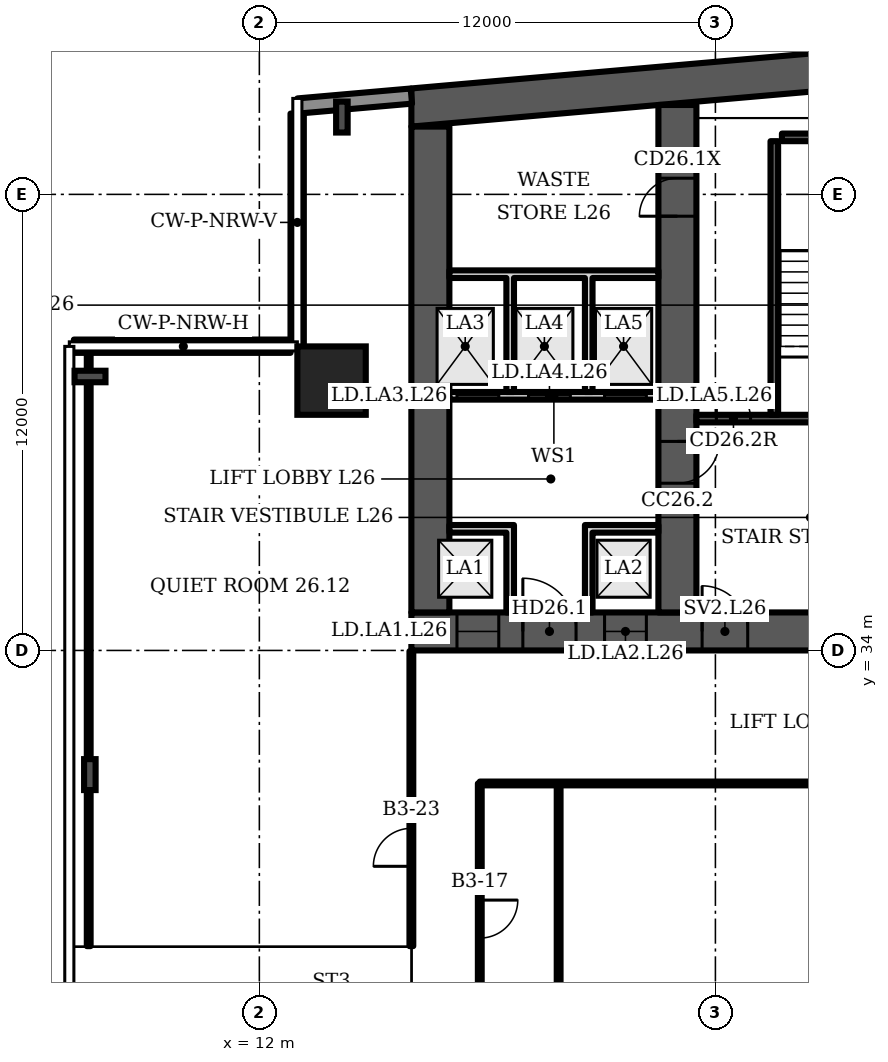
"""IFC4 building model, lengths in metres.
Left out: names, types, materials, properties, quantities, classifications, styles, units other than length and angle.
Written with IfcOpenShell. Run it as: python <this file> out.ifc"""

import sys

from ifc_helpers import new_model, si_unit, direction, frame, frame_2d, origin, origin_2d, place, context, subcontext, project, spatial, polyline, rectangle, i_section, outline, extrude, element, fill, save


model = new_model("IFC4")
c1 = context("Model", 3, precision=1e-05, world=origin(), true_north=direction((0.0, 1.0)))
c2 = subcontext(c1, "Body", "Model", "MODEL_VIEW")
j1 = project(units=[si_unit("LENGTHUNIT", "METRE"), si_unit("PLANEANGLEUNIT", "RADIAN")], contexts=[c1])
p1 = place(None, origin())
s1 = spatial("IfcSite", under=j1, at=p1, CompositionType="ELEMENT")
p2 = place(p1, origin())
s2 = spatial("IfcBuilding", under=s1, at=p2, CompositionType="ELEMENT")
p3 = place(p2, frame((0.0, 0.0, 114.7)))
s3 = spatial("IfcBuildingStorey", under=s2, at=p3, CompositionType="ELEMENT", Elevation=114.7)
p4 = place(p3, origin())
e1 = element("IfcWall", 1, at=p4, inside=s3, PredefinedType="SHEAR", context=c2, shape_type="SweptSolid", body=[
    extrude(outline(polyline([(16.0, 47.784), (40.5, 49.927), (65.0, 47.784), (65.0, 48.787), (40.5, 50.931), (16.0, 48.787), (16.0, 47.784)])), origin(), (0.0, 0.0, 1.0), 3.6),
])
p5 = place(p3, frame((16.0, 34.5, 0.0), z_axis=(0.0, 0.0, 1.0), x_axis=(1.0, 0.0, 0.0)))
e2 = element("IfcWall", 2, at=p5, inside=s3, PredefinedType="SHEAR", context=c2, shape_type="SweptSolid", body=[
    extrude(rectangle(XDim=49.0, YDim=1.0, at=frame_2d((24.5, 0.0))), origin(), (0.0, 0.0, 1.0), 3.6),
])
p6 = place(p5, frame((1.2, 0.0, 0.0)))
e3 = element("IfcOpeningElement", 3, at=p6, cuts=e2, PredefinedType="OPENING", context=c2, shape_type="SweptSolid", body=[
    extrude(rectangle(XDim=1.1, YDim=2.1, at=frame_2d((0.55, 1.05))), frame((0.0, 0.51, 0.0), z_axis=(0.0, -1.0, 0.0), x_axis=(1.0, 0.0, 0.0)), (0.0, 0.0, 1.0), 1.02),
])
p7 = place(p5, frame((5.083, 0.0, 0.0)))
e4 = element("IfcOpeningElement", 4, at=p7, cuts=e2, PredefinedType="OPENING", context=c2, shape_type="SweptSolid", body=[
    extrude(rectangle(XDim=1.1, YDim=2.1, at=frame_2d((0.55, 1.05))), frame((0.0, 0.51, 0.0), z_axis=(0.0, -1.0, 0.0), x_axis=(1.0, 0.0, 0.0)), (0.0, 0.0, 1.0), 1.02),
])
p8 = place(p5, frame((2.933, 0.0, 0.0)))
e5 = element("IfcOpeningElement", 5, at=p8, cuts=e2, PredefinedType="OPENING", context=c2, shape_type="SweptSolid", body=[
    extrude(rectangle(XDim=1.4, YDim=2.1, at=frame_2d((0.7, 1.05))), frame((0.0, 0.51, 0.0), z_axis=(0.0, -1.0, 0.0), x_axis=(1.0, 0.0, 0.0)), (0.0, 0.0, 1.0), 1.02),
])
p9 = place(p5, frame((7.65, 0.0, 0.0)))
e6 = element("IfcOpeningElement", 6, at=p9, cuts=e2, PredefinedType="OPENING", context=c2, shape_type="SweptSolid", body=[
    extrude(rectangle(XDim=1.2, YDim=2.1, at=frame_2d((0.6, 1.05))), frame((0.0, 0.51, 0.0), z_axis=(0.0, -1.0, 0.0), x_axis=(1.0, 0.0, 0.0)), (0.0, 0.0, 1.0), 1.02),
])
p10 = place(p5, frame((14.817, 0.0, 0.0)))
e7 = element("IfcOpeningElement", 7, at=p10, cuts=e2, PredefinedType="OPENING", context=c2, shape_type="SweptSolid", body=[
    extrude(rectangle(XDim=1.1, YDim=2.1, at=frame_2d((0.55, 1.05))), frame((0.0, 0.51, 0.0), z_axis=(0.0, -1.0, 0.0), x_axis=(1.0, 0.0, 0.0)), (0.0, 0.0, 1.0), 1.02),
])
p11 = place(p5, frame((19.083, 0.0, 0.0)))
e8 = element("IfcOpeningElement", 8, at=p11, cuts=e2, PredefinedType="OPENING", context=c2, shape_type="SweptSolid", body=[
    extrude(rectangle(XDim=1.1, YDim=2.1, at=frame_2d((0.55, 1.05))), frame((0.0, 0.51, 0.0), z_axis=(0.0, -1.0, 0.0), x_axis=(1.0, 0.0, 0.0)), (0.0, 0.0, 1.0), 1.02),
])
p12 = place(p5, frame((16.8, 0.0, 0.0)))
e9 = element("IfcOpeningElement", 9, at=p12, cuts=e2, PredefinedType="OPENING", context=c2, shape_type="SweptSolid", body=[
    extrude(rectangle(XDim=1.4, YDim=2.1, at=frame_2d((0.7, 1.05))), frame((0.0, 0.51, 0.0), z_axis=(0.0, -1.0, 0.0), x_axis=(1.0, 0.0, 0.0)), (0.0, 0.0, 1.0), 1.02),
])
p13 = place(p5, frame((21.817, 0.0, 0.0)))
e10 = element("IfcOpeningElement", 10, at=p13, cuts=e2, PredefinedType="OPENING", context=c2, shape_type="SweptSolid", body=[
    extrude(rectangle(XDim=1.1, YDim=2.1, at=frame_2d((0.55, 1.05))), frame((0.0, 0.51, 0.0), z_axis=(0.0, -1.0, 0.0), x_axis=(1.0, 0.0, 0.0)), (0.0, 0.0, 1.0), 1.02),
])
p14 = place(p5, frame((26.083, 0.0, 0.0)))
e11 = element("IfcOpeningElement", 11, at=p14, cuts=e2, PredefinedType="OPENING", context=c2, shape_type="SweptSolid", body=[
    extrude(rectangle(XDim=1.1, YDim=2.1, at=frame_2d((0.55, 1.05))), frame((0.0, 0.51, 0.0), z_axis=(0.0, -1.0, 0.0), x_axis=(1.0, 0.0, 0.0)), (0.0, 0.0, 1.0), 1.02),
])
p15 = place(p5, frame((33.15, 0.0, 0.0)))
e12 = element("IfcOpeningElement", 12, at=p15, cuts=e2, PredefinedType="OPENING", context=c2, shape_type="SweptSolid", body=[
    extrude(rectangle(XDim=1.2, YDim=2.1, at=frame_2d((0.6, 1.05))), frame((0.0, 0.51, 0.0), z_axis=(0.0, -1.0, 0.0), x_axis=(1.0, 0.0, 0.0)), (0.0, 0.0, 1.0), 1.02),
])
p16 = place(p5, frame((37.8, 0.0, 0.0)))
e13 = element("IfcOpeningElement", 13, at=p16, cuts=e2, PredefinedType="OPENING", context=c2, shape_type="SweptSolid", body=[
    extrude(rectangle(XDim=1.4, YDim=2.1, at=frame_2d((0.7, 1.05))), frame((0.0, 0.51, 0.0), z_axis=(0.0, -1.0, 0.0), x_axis=(1.0, 0.0, 0.0)), (0.0, 0.0, 1.0), 1.02),
])
p17 = place(p5, frame((42.817, 0.0, 0.0)))
e14 = element("IfcOpeningElement", 14, at=p17, cuts=e2, PredefinedType="OPENING", context=c2, shape_type="SweptSolid", body=[
    extrude(rectangle(XDim=1.1, YDim=2.1, at=frame_2d((0.55, 1.05))), frame((0.0, 0.51, 0.0), z_axis=(0.0, -1.0, 0.0), x_axis=(1.0, 0.0, 0.0)), (0.0, 0.0, 1.0), 1.02),
])
p18 = place(p5, frame((46.7, 0.0, 0.0)))
e15 = element("IfcOpeningElement", 15, at=p18, cuts=e2, PredefinedType="OPENING", context=c2, shape_type="SweptSolid", body=[
    extrude(rectangle(XDim=1.1, YDim=2.1, at=frame_2d((0.55, 1.05))), frame((0.0, 0.51, 0.0), z_axis=(0.0, -1.0, 0.0), x_axis=(1.0, 0.0, 0.0)), (0.0, 0.0, 1.0), 1.02),
])
p19 = place(p5, frame((44.667, 0.0, 0.0)))
e16 = element("IfcOpeningElement", 16, at=p19, cuts=e2, PredefinedType="OPENING", context=c2, shape_type="SweptSolid", body=[
    extrude(rectangle(XDim=1.4, YDim=2.1, at=frame_2d((0.7, 1.05))), frame((0.0, 0.51, 0.0), z_axis=(0.0, -1.0, 0.0), x_axis=(1.0, 0.0, 0.0)), (0.0, 0.0, 1.0), 1.02),
])
p20 = place(p3, frame((16.5, 35.0, 0.0), z_axis=(0.0, 0.0, 1.0), x_axis=(0.0, 1.0, 0.0)))
e17 = element("IfcWall", 17, at=p20, inside=s3, PredefinedType="SHEAR", context=c2, shape_type="SweptSolid", body=[
    extrude(rectangle(XDim=12.784, YDim=1.0, at=frame_2d((6.392, 0.0))), origin(), (0.0, 0.0, 1.0), 3.6),
])
p21 = place(p3, frame((23.0, 35.0, 0.0), z_axis=(0.0, 0.0, 1.0), x_axis=(0.0, 1.0, 0.0)))
e18 = element("IfcWall", 18, at=p21, inside=s3, PredefinedType="SHEAR", context=c2, shape_type="SweptSolid", body=[
    extrude(rectangle(XDim=13.352, YDim=1.0, at=frame_2d((6.676, 0.0))), origin(), (0.0, 0.0, 1.0), 3.6),
])
p22 = place(p21, frame((10.426, 0.0, 0.0)))
e19 = element("IfcOpeningElement", 19, at=p22, cuts=e18, PredefinedType="OPENING", context=c2, shape_type="SweptSolid", body=[
    extrude(rectangle(XDim=1.0, YDim=2.1, at=frame_2d((0.5, 1.05))), frame((0.0, 0.51, 0.0), z_axis=(0.0, -1.0, 0.0), x_axis=(1.0, 0.0, 0.0)), (0.0, 0.0, 1.0), 1.02),
])
p23 = place(p21, frame((3.4, 0.0, 0.0)))
e20 = element("IfcOpeningElement", 20, at=p23, cuts=e18, PredefinedType="OPENING", context=c2, shape_type="SweptSolid", body=[
    extrude(rectangle(XDim=1.1, YDim=2.1, at=frame_2d((0.55, 1.05))), frame((0.0, 0.51, 0.0), z_axis=(0.0, -1.0, 0.0), x_axis=(1.0, 0.0, 0.0)), (0.0, 0.0, 1.0), 1.02),
])
p24 = place(p3, frame((13.9, 41.1, 0.0), z_axis=(0.0, 0.0, 1.0), x_axis=(1.0, 0.0, 0.0)))
e21 = element("IfcColumn", 21, at=p24, inside=s3, PredefinedType="COLUMN", context=c2, shape_type="SweptSolid", body=[
    extrude(rectangle(XDim=1.8, YDim=1.8, at=origin_2d()), origin(), (0.0, 0.0, 1.0), 3.6),
])
for number, where, z_axis, x_axis in (
    (22, (14.172, 48.034, 0.0), (0.0, 0.0, 1.0), (-1.0, 0.0, 0.0)),
    (23, (7.544, 41.208, 0.0), (0.0, 0.0, 1.0), (0.0, 1.0, 0.0)),
    (24, (7.54, 30.733, 0.0), (0.0, 0.0, 1.0), (-1.0, 0.0, 0.0)),
):
    element("IfcColumn", number, at=place(p3, frame(where, z_axis=z_axis, x_axis=x_axis)), inside=s3, PredefinedType="COLUMN", context=c2, shape_type="SweptSolid", body=[
        extrude(i_section(OverallWidth=0.303, OverallDepth=0.814, WebThickness=0.021, FlangeThickness=0.04, FilletRadius=0.03, at=origin_2d()), origin(), (0.0, 0.0, 1.0), 3.6),
    ])
p25 = place(p3, frame((16.0, 48.587, 0.0), z_axis=(0.0, 0.0, 1.0), x_axis=(-0.996194, -0.087168, 0.0)))
e25 = element("IfcWall", 25, at=p25, inside=s3, PredefinedType="SOLIDWALL", context=c2, shape_type="SweptSolid", body=[
    extrude(rectangle(XDim=2.994, YDim=0.4, at=frame_2d((1.497, 0.0))), origin(), (0.0, 0.0, 1.0), 3.2),
])
p26 = place(p3, frame((12.995, 48.126, 0.0), z_axis=(0.0, 0.0, 1.0), x_axis=(0.0, -1.0, 0.0)))
e26 = element("IfcWall", 26, at=p26, inside=s3, PredefinedType="SOLIDWALL", context=c2, shape_type="SweptSolid", body=[
    extrude(rectangle(XDim=6.126, YDim=0.35, at=frame_2d((3.063, 0.0))), origin(), (0.0, 0.0, 1.0), 1.0),
])
p27 = place(p3, frame((12.82, 42.005, 0.0), z_axis=(0.0, 0.0, 1.0), x_axis=(-1.0, 0.0, 0.0)))
e27 = element("IfcWall", 27, at=p27, inside=s3, PredefinedType="SOLIDWALL", context=c2, shape_type="SweptSolid", body=[
    extrude(rectangle(XDim=5.7, YDim=0.35, at=frame_2d((2.85, 0.0))), origin(), (0.0, 0.0, 1.0), 1.0),
])
p28 = place(p3, frame((17.0, 40.7, 0.0), z_axis=(0.0, 0.0, 1.0), x_axis=(1.0, 0.0, 0.0)))
e28 = element("IfcWall", 28, at=p28, inside=s3, PredefinedType="PARTITIONING", context=c2, shape_type="SweptSolid", body=[
    extrude(rectangle(XDim=5.5, YDim=0.2, at=frame_2d((2.75, 0.0))), origin(), (0.0, 0.0, 1.0), 3.2),
])
p29 = place(p28, frame((0.2, 0.0, 0.0)))
e29 = element("IfcOpeningElement", 29, at=p29, cuts=e28, PredefinedType="OPENING", context=c2, shape_type="SweptSolid", body=[
    extrude(rectangle(XDim=1.1, YDim=2.1, at=frame_2d((0.55, 1.05))), frame((0.0, 0.11, 0.0), z_axis=(0.0, -1.0, 0.0), x_axis=(1.0, 0.0, 0.0)), (0.0, 0.0, 1.0), 0.22),
])
p30 = place(p28, frame((2.083, 0.0, 0.0)))
e30 = element("IfcOpeningElement", 30, at=p30, cuts=e28, PredefinedType="OPENING", context=c2, shape_type="SweptSolid", body=[
    extrude(rectangle(XDim=1.1, YDim=2.1, at=frame_2d((0.55, 1.05))), frame((0.0, 0.11, 0.0), z_axis=(0.0, -1.0, 0.0), x_axis=(1.0, 0.0, 0.0)), (0.0, 0.0, 1.0), 0.22),
])
p31 = place(p28, frame((4.083, 0.0, 0.0)))
e31 = element("IfcOpeningElement", 31, at=p31, cuts=e28, PredefinedType="OPENING", context=c2, shape_type="SweptSolid", body=[
    extrude(rectangle(XDim=1.1, YDim=2.1, at=frame_2d((0.55, 1.05))), frame((0.0, 0.11, 0.0), z_axis=(0.0, -1.0, 0.0), x_axis=(1.0, 0.0, 0.0)), (0.0, 0.0, 1.0), 0.22),
])
p32 = place(p3, frame((0.0, 0.0, -0.0)))
e32 = element("IfcWall", 32, at=p32, inside=s3, PredefinedType="PARTITIONING", context=c2, shape_type="SweptSolid", body=[
    extrude(outline(polyline([(18.5, 37.1), (17.0, 37.1), (17.0, 37.3), (18.5, 37.3), (18.7, 37.3), (18.7, 35.0), (18.5, 35.0), (18.5, 37.1)])), origin(), (0.0, 0.0, 1.0), 3.2),
])
p33 = place(p3, frame((0.0, 0.0, -0.0)))
e33 = element("IfcWall", 33, at=p33, inside=s3, PredefinedType="PARTITIONING", context=c2, shape_type="SweptSolid", body=[
    extrude(outline(polyline([(20.567, 37.3), (20.767, 37.3), (22.5, 37.3), (22.5, 37.1), (20.767, 37.1), (20.767, 35.0), (20.567, 35.0), (20.567, 37.3)])), origin(), (0.0, 0.0, 1.0), 3.2),
])
p34 = place(p3, frame((0.0, 0.0, -0.0)))
e34 = element("IfcWall", 34, at=p34, inside=s3, PredefinedType="PARTITIONING", context=c2, shape_type="SweptSolid", body=[
    extrude(outline(polyline([(18.7, 40.8), (18.5, 40.8), (18.5, 43.8), (17.0, 43.8), (17.0, 44.0), (22.5, 44.0), (22.5, 43.8), (20.767, 43.8), (20.767, 40.8), (20.567, 40.8), (20.567, 43.8), (18.7, 43.8), (18.7, 40.8)])), origin(), (0.0, 0.0, 1.0), 3.2),
])
p35 = place(p3, frame((23.5, 40.1, 0.0), z_axis=(0.0, 0.0, 1.0), x_axis=(1.0, 0.0, 0.0)))
e35 = element("IfcWall", 35, at=p35, inside=s3, PredefinedType="SHEAR", context=c2, shape_type="SweptSolid", body=[
    extrude(rectangle(XDim=6.0, YDim=0.2, at=frame_2d((3.0, 0.0))), origin(), (0.0, 0.0, 1.0), 3.2),
])
p36 = place(p35, frame((3.425, 0.0, 0.0)))
e36 = element("IfcOpeningElement", 36, at=p36, cuts=e35, PredefinedType="OPENING", context=c2, shape_type="SweptSolid", body=[
    extrude(rectangle(XDim=1.2, YDim=2.1, at=frame_2d((0.6, 1.05))), frame((0.0, 0.11, 0.0), z_axis=(0.0, -1.0, 0.0), x_axis=(1.0, 0.0, 0.0)), (0.0, 0.0, 1.0), 0.22),
])
p37 = place(p35, frame((0.525, 0.0, 0.0)))
e37 = element("IfcOpeningElement", 37, at=p37, cuts=e35, PredefinedType="OPENING", context=c2, shape_type="SweptSolid", body=[
    extrude(rectangle(XDim=0.9, YDim=2.1, at=frame_2d((0.45, 1.05))), frame((0.0, 0.11, 0.0), z_axis=(0.0, -1.0, 0.0), x_axis=(1.0, 0.0, 0.0)), (0.0, 0.0, 1.0), 0.22),
])
p38 = place(p3, frame((25.55, 40.2, 0.0), z_axis=(0.0, 0.0, 1.0), x_axis=(0.0, 1.0, 0.0)))
e38 = element("IfcWall", 38, at=p38, inside=s3, PredefinedType="SHEAR", context=c2, shape_type="SweptSolid", body=[
    extrude(rectangle(XDim=7.2, YDim=0.2, at=frame_2d((3.6, 0.0))), origin(), (0.0, 0.0, 1.0), 3.2),
])
p39 = place(p3, frame((25.75, 47.5, 0.0), z_axis=(0.0, 0.0, 1.0), x_axis=(1.0, 0.0, 0.0)))
e39 = element("IfcWall", 39, at=p39, inside=s3, PredefinedType="SHEAR", context=c2, shape_type="SweptSolid", body=[
    extrude(rectangle(XDim=3.75, YDim=0.2, at=frame_2d((1.875, 0.0))), origin(), (0.0, 0.0, 1.0), 3.2),
])
p40 = place(p3, frame((7.51, 26.22, 0.0), z_axis=(0.0, 0.0, 1.0), x_axis=(0.0, 1.0, 0.0)))
e40 = element("IfcWall", 40, at=p40, inside=s3, PredefinedType="PARTITIONING", context=c2, shape_type="SweptSolid", body=[
    extrude(rectangle(XDim=15.76, YDim=0.1, at=frame_2d((7.88, 0.0))), origin(), (0.0, 0.0, 1.0), 2.58),
])
p41 = place(p3, frame((16.0, 26.22, 0.0), z_axis=(0.0, 0.0, 1.0), x_axis=(0.0, 1.0, 0.0)))
e41 = element("IfcWall", 41, at=p41, inside=s3, PredefinedType="PARTITIONING", context=c2, shape_type="SweptSolid", body=[
    extrude(rectangle(XDim=7.76, YDim=0.1, at=frame_2d((3.88, 0.0))), origin(), (0.0, 0.0, 1.0), 3.2),
])
p42 = place(p41, frame((2.1, 0.0, 0.0)))
e42 = element("IfcOpeningElement", 42, at=p42, cuts=e41, PredefinedType="OPENING", context=c2, shape_type="SweptSolid", body=[
    extrude(rectangle(XDim=1.0, YDim=2.1, at=frame_2d((0.5, 1.05))), frame((0.0, 0.06, 0.0), z_axis=(0.0, -1.0, 0.0), x_axis=(1.0, 0.0, 0.0)), (0.0, 0.0, 1.0), 0.12),
])
p43 = place(p3, frame((17.8, 21.8, 0.0), z_axis=(0.0, 0.0, 1.0), x_axis=(0.0, 1.0, 0.0)))
e43 = element("IfcWall", 43, at=p43, inside=s3, PredefinedType="PARTITIONING", context=c2, shape_type="SweptSolid", body=[
    extrude(rectangle(XDim=8.7, YDim=0.1, at=frame_2d((4.35, 0.0))), origin(), (0.0, 0.0, 1.0), 3.2),
])
p44 = place(p43, frame((4.631, 0.0, 0.0)))
e44 = element("IfcOpeningElement", 44, at=p44, cuts=e43, PredefinedType="OPENING", context=c2, shape_type="SweptSolid", body=[
    extrude(rectangle(XDim=1.0, YDim=2.1, at=frame_2d((0.5, 1.05))), frame((0.0, 0.06, 0.0), z_axis=(0.0, -1.0, 0.0), x_axis=(1.0, 0.0, 0.0)), (0.0, 0.0, 1.0), 0.12),
])
p45 = place(p3, frame((17.8, 30.5, 0.0), z_axis=(0.0, 0.0, 1.0), x_axis=(1.0, 0.0, 0.0)))
e45 = element("IfcWall", 45, at=p45, inside=s3, PredefinedType="PARTITIONING", context=c2, shape_type="SweptSolid", body=[
    extrude(rectangle(XDim=13.8, YDim=0.1, at=frame_2d((6.9, 0.0))), origin(), (0.0, 0.0, 1.0), 3.2),
])
p46 = place(p3, frame((19.875, 15.13, 0.0), z_axis=(0.0, 0.0, 1.0), x_axis=(0.0, 1.0, 0.0)))
e46 = element("IfcWall", 46, at=p46, inside=s3, PredefinedType="PARTITIONING", context=c2, shape_type="SweptSolid", body=[
    extrude(rectangle(XDim=15.37, YDim=0.1, at=frame_2d((7.685, 0.0))), origin(), (0.0, 0.0, 1.0), 3.2),
])
p47 = place(p6, origin())
e47 = element("IfcDoor", 47, at=p47, inside=s3, OperationType="DOUBLE_DOOR_SLIDING", PredefinedType="DOOR", context=c2, shape_type="SweptSolid", body=[
    extrude(rectangle(XDim=1.1, YDim=2.1, at=frame_2d((0.55, 1.05))), frame((0.0, 0.025, 0.0), z_axis=(0.0, -1.0, 0.0), x_axis=(1.0, 0.0, 0.0)), (0.0, 0.0, 1.0), 0.05),
])
fill(e3, e47)
p48 = place(p7, origin())
e48 = element("IfcDoor", 48, at=p48, inside=s3, OperationType="DOUBLE_DOOR_SLIDING", PredefinedType="DOOR", context=c2, shape_type="SweptSolid", body=[
    extrude(rectangle(XDim=1.1, YDim=2.1, at=frame_2d((0.55, 1.05))), frame((0.0, 0.025, 0.0), z_axis=(0.0, -1.0, 0.0), x_axis=(1.0, 0.0, 0.0)), (0.0, 0.0, 1.0), 0.05),
])
fill(e4, e48)
p49 = place(p8, origin())
e49 = element("IfcDoor", 49, at=p49, inside=s3, OperationType="DOUBLE_DOOR_SINGLE_SWING", PredefinedType="DOOR", context=c2, shape_type="SweptSolid", body=[
    extrude(rectangle(XDim=1.4, YDim=2.1, at=frame_2d((0.7, 1.05))), frame((0.0, 0.025, 0.0), z_axis=(0.0, -1.0, 0.0), x_axis=(1.0, 0.0, 0.0)), (0.0, 0.0, 1.0), 0.05),
])
fill(e5, e49)
p50 = place(p29, origin())
e50 = element("IfcDoor", 50, at=p50, inside=s3, OperationType="DOUBLE_DOOR_SLIDING", PredefinedType="DOOR", context=c2, shape_type="SweptSolid", body=[
    extrude(rectangle(XDim=1.1, YDim=2.1, at=frame_2d((0.55, 1.05))), frame((0.0, 0.025, 0.0), z_axis=(0.0, -1.0, 0.0), x_axis=(1.0, 0.0, 0.0)), (0.0, 0.0, 1.0), 0.05),
])
fill(e29, e50)
p51 = place(p30, origin())
e51 = element("IfcDoor", 51, at=p51, inside=s3, OperationType="DOUBLE_DOOR_SLIDING", PredefinedType="DOOR", context=c2, shape_type="SweptSolid", body=[
    extrude(rectangle(XDim=1.1, YDim=2.1, at=frame_2d((0.55, 1.05))), frame((0.0, 0.025, 0.0), z_axis=(0.0, -1.0, 0.0), x_axis=(1.0, 0.0, 0.0)), (0.0, 0.0, 1.0), 0.05),
])
fill(e30, e51)
p52 = place(p31, origin())
e52 = element("IfcDoor", 52, at=p52, inside=s3, OperationType="DOUBLE_DOOR_SLIDING", PredefinedType="DOOR", context=c2, shape_type="SweptSolid", body=[
    extrude(rectangle(XDim=1.1, YDim=2.1, at=frame_2d((0.55, 1.05))), frame((0.0, 0.025, 0.0), z_axis=(0.0, -1.0, 0.0), x_axis=(1.0, 0.0, 0.0)), (0.0, 0.0, 1.0), 0.05),
])
fill(e31, e52)
p53 = place(p22, origin())
e53 = element("IfcDoor", 53, at=p53, inside=s3, OperationType="SINGLE_SWING_LEFT", PredefinedType="DOOR", context=c2, shape_type="SweptSolid", body=[
    extrude(rectangle(XDim=1.0, YDim=2.1, at=frame_2d((0.5, 1.05))), frame((0.0, 0.5, 0.0), z_axis=(0.0, -1.0, 0.0), x_axis=(1.0, 0.0, 0.0)), (0.0, 0.0, 1.0), 1.0),
])
fill(e19, e53)
p54 = place(p37, origin())
e54 = element("IfcDoor", 54, at=p54, inside=s3, OperationType="SINGLE_SWING_LEFT", PredefinedType="DOOR", context=c2, shape_type="SweptSolid", body=[
    extrude(rectangle(XDim=0.9, YDim=2.1, at=frame_2d((0.45, 1.05))), frame((0.0, 0.025, 0.0), z_axis=(0.0, -1.0, 0.0), x_axis=(1.0, 0.0, 0.0)), (0.0, 0.0, 1.0), 0.05),
])
fill(e37, e54)
p55 = place(p9, origin())
e55 = element("IfcDoor", 55, at=p55, inside=s3, OperationType="SINGLE_SWING_LEFT", PredefinedType="DOOR", context=c2, shape_type="SweptSolid", body=[
    extrude(rectangle(XDim=1.2, YDim=2.1, at=frame_2d((0.6, 1.05))), frame((0.0, 0.025, 0.0), z_axis=(0.0, -1.0, 0.0), x_axis=(1.0, 0.0, 0.0)), (0.0, 0.0, 1.0), 0.05),
])
fill(e6, e55)
p56 = place(p23, origin())
e56 = element("IfcDoor", 56, at=p56, inside=s3, OperationType="SINGLE_SWING_RIGHT", PredefinedType="DOOR", context=c2, shape_type="SweptSolid", body=[
    extrude(rectangle(XDim=1.1, YDim=2.1, at=frame_2d((0.55, 1.05))), frame((0.0, 0.025, 0.0), z_axis=(0.0, -1.0, 0.0), x_axis=(1.0, 0.0, 0.0)), (0.0, 0.0, 1.0), 0.05),
])
fill(e20, e56)
p57 = place(p44, origin())
e57 = element("IfcDoor", 57, at=p57, inside=s3, OperationType="SINGLE_SWING_RIGHT", PredefinedType="DOOR", context=c2, shape_type="SweptSolid", body=[
    extrude(rectangle(XDim=1.0, YDim=2.1, at=frame_2d((0.5, 1.05))), frame((0.0, 0.025, 0.0), z_axis=(0.0, -1.0, 0.0), x_axis=(1.0, 0.0, 0.0)), (0.0, 0.0, 1.0), 0.05),
])
fill(e44, e57)
p58 = place(p42, origin())
e58 = element("IfcDoor", 58, at=p58, inside=s3, OperationType="SINGLE_SWING_LEFT", PredefinedType="DOOR", context=c2, shape_type="SweptSolid", body=[
    extrude(rectangle(XDim=1.0, YDim=2.1, at=frame_2d((0.5, 1.05))), frame((0.0, 0.025, 0.0), z_axis=(0.0, -1.0, 0.0), x_axis=(1.0, 0.0, 0.0)), (0.0, 0.0, 1.0), 0.05),
])
fill(e42, e58)
save(model, sys.argv[1])
